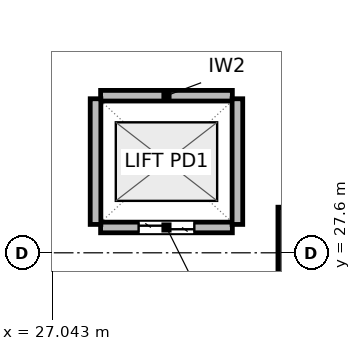
"""IFC4 building model, lengths in metres.
Left out: names, types, materials, properties, quantities, classifications, styles, units other than length and angle.
Written with IfcOpenShell. Run it as: python <this file> out.ifc"""

import sys

from ifc_helpers import new_model, si_unit, direction, frame, frame_2d, origin, origin_2d, place, context, subcontext, project, spatial, rectangle, extrude, element, fill, save


model = new_model("IFC4")
c1 = context("Model", 3, precision=1e-05, world=origin(), true_north=direction((0.0, 1.0)))
c2 = subcontext(c1, "Body", "Model", "MODEL_VIEW")
j1 = project(units=[si_unit("LENGTHUNIT", "METRE"), si_unit("PLANEANGLEUNIT", "RADIAN")], contexts=[c1])
p1 = place(None, origin())
s1 = spatial("IfcSite", under=j1, at=p1, CompositionType="ELEMENT")
p2 = place(p1, origin())
s2 = spatial("IfcBuilding", under=s1, at=p2, CompositionType="ELEMENT")
p3 = place(p2, frame((0.0, 0.0, 4.5)))
s3 = spatial("IfcBuildingStorey", under=s2, at=p3, CompositionType="ELEMENT", Elevation=4.5)
p4 = place(p3, frame((32.4, 27.6, 0.0), z_axis=(0.0, 0.0, 1.0), x_axis=(1.0, 0.0, 0.0)))
e1 = element("IfcColumn", 1, at=p4, inside=s3, PredefinedType="COLUMN", context=c2, shape_type="SweptSolid", body=[
    extrude(rectangle(XDim=1.8, YDim=1.8, at=origin_2d()), origin(), (0.0, 0.0, 1.0), 4.2),
])
p5 = place(p3, frame((28.0, 28.1, 0.0), z_axis=(0.0, 0.0, 1.0), x_axis=(1.0, 0.0, 0.0)))
e2 = element("IfcWall", 2, at=p5, inside=s3, PredefinedType="PARTITIONING", context=c2, shape_type="SweptSolid", body=[
    extrude(rectangle(XDim=2.6, YDim=0.21, at=frame_2d((1.3, 0.0))), origin(), (0.0, 0.0, 1.0), 3.88),
])
p6 = place(p5, frame((0.75, 0.0, 0.0)))
e3 = element("IfcOpeningElement", 3, at=p6, cuts=e2, PredefinedType="OPENING", context=c2, shape_type="SweptSolid", body=[
    extrude(rectangle(XDim=1.1, YDim=2.04, at=frame_2d((0.55, 1.02))), frame((0.0, 0.115, 0.0), z_axis=(0.0, -1.0, 0.0), x_axis=(1.0, 0.0, 0.0)), (0.0, 0.0, 1.0), 0.23),
])
p7 = place(p3, frame((28.0, 30.7, 0.0), z_axis=(0.0, 0.0, 1.0), x_axis=(1.0, 0.0, 0.0)))
e4 = element("IfcWall", 4, at=p7, inside=s3, PredefinedType="PARTITIONING", context=c2, shape_type="SweptSolid", body=[
    extrude(rectangle(XDim=2.6, YDim=0.21, at=frame_2d((1.3, 0.0))), origin(), (0.0, 0.0, 1.0), 3.88),
])
for number, where, z_axis, x_axis in (
    (5, (27.9, 28.16, 0.0), (0.0, 0.0, 1.0), (0.0, 1.0, 0.0)),
    (6, (30.7, 28.16, 0.0), (0.0, 0.0, 1.0), (0.0, 1.0, 0.0)),
):
    element("IfcWall", number, at=place(p3, frame(where, z_axis=z_axis, x_axis=x_axis)), inside=s3, PredefinedType="PARTITIONING", context=c2, shape_type="SweptSolid", body=[
        extrude(rectangle(XDim=2.48, YDim=0.21, at=frame_2d((1.24, 0.0))), origin(), (0.0, 0.0, 1.0), 3.88),
    ])
p8 = place(p6, origin())
e7 = element("IfcDoor", 7, at=p8, inside=s3, OperationType="DOUBLE_DOOR_SLIDING", PredefinedType="DOOR", context=c2, shape_type="SweptSolid", body=[
    extrude(rectangle(XDim=1.1, YDim=2.04, at=frame_2d((0.55, 1.02))), frame((0.0, 0.025, 0.0), z_axis=(0.0, -1.0, 0.0), x_axis=(1.0, 0.0, 0.0)), (0.0, 0.0, 1.0), 0.05),
])
fill(e3, e7)
save(model, sys.argv[1])
